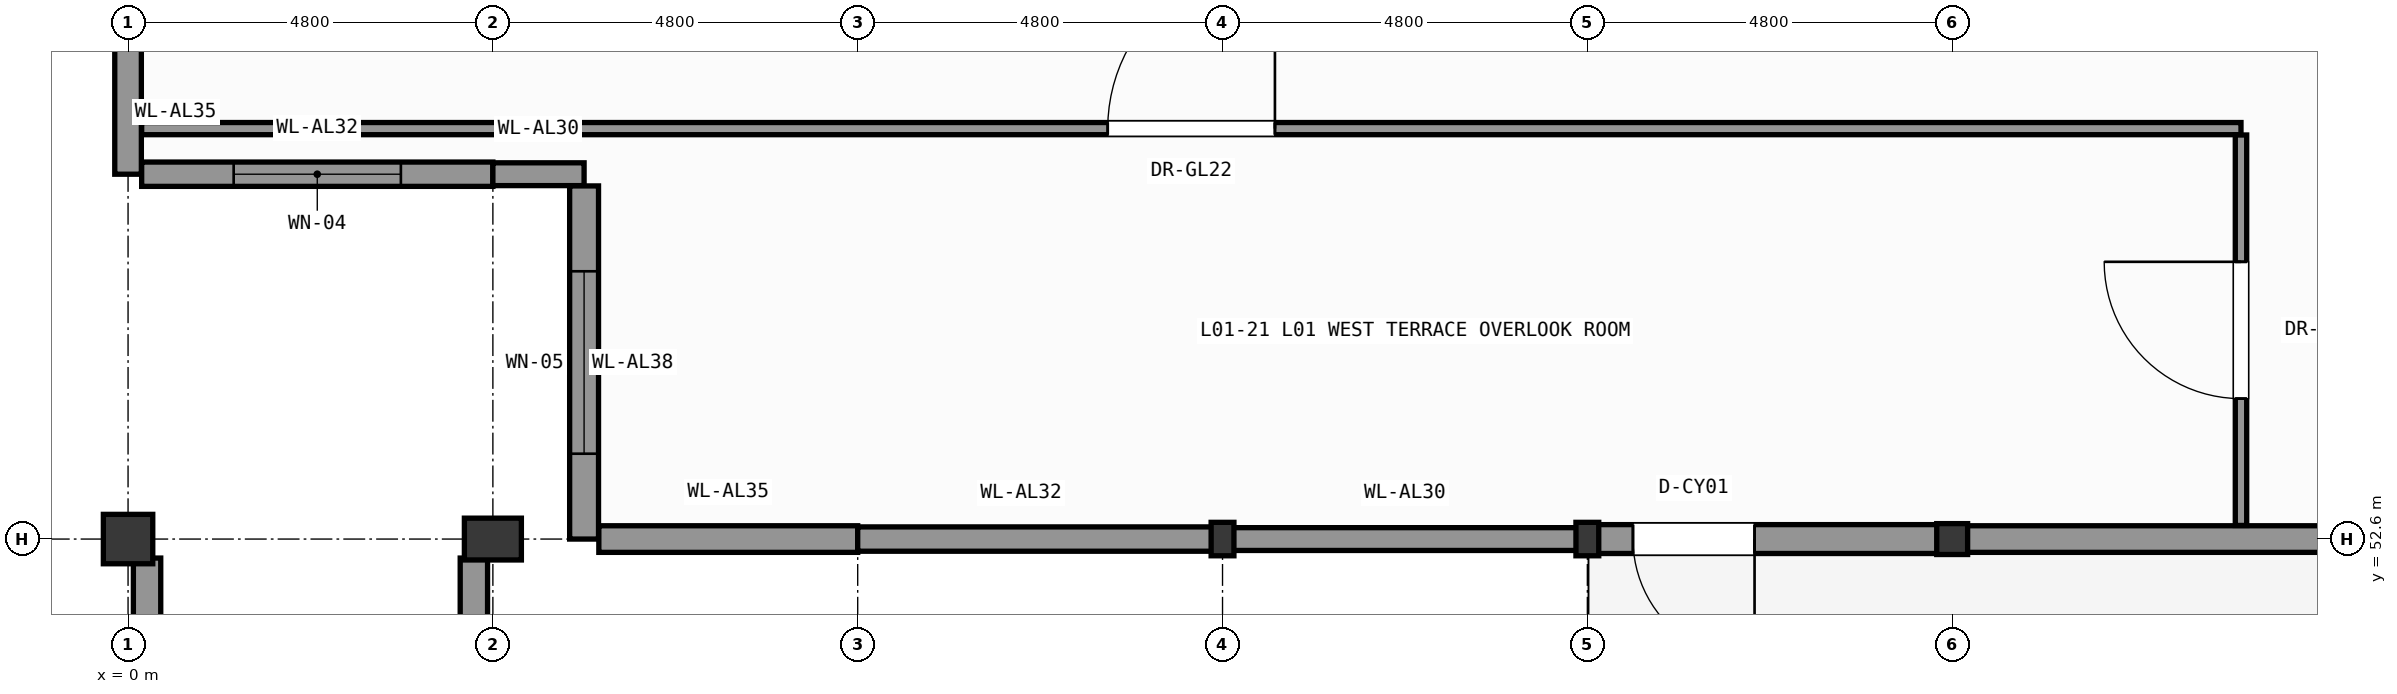
"""IFC4 building model, lengths in metres.
Left out: names, types, materials, properties, quantities, classifications, styles, units other than length and angle.
Written with IfcOpenShell. Run it as: python <this file> out.ifc"""

import sys

from ifc_helpers import new_model, si_unit, direction, frame, frame_2d, origin, origin_2d, place, context, subcontext, project, spatial, rectangle, hollow_circle, i_section, extrude, element, fill, save


model = new_model("IFC4")
c1 = context("Model", 3, precision=1e-05, world=origin(), true_north=direction((0.0, 1.0)))
c2 = subcontext(c1, "Body", "Model", "MODEL_VIEW")
j1 = project(units=[si_unit("LENGTHUNIT", "METRE"), si_unit("PLANEANGLEUNIT", "RADIAN")], contexts=[c1])
p1 = place(None, origin())
s1 = spatial("IfcSite", under=j1, at=p1, CompositionType="ELEMENT")
p2 = place(p1, origin())
s2 = spatial("IfcBuilding", under=s1, at=p2, CompositionType="ELEMENT")
p3 = place(p2, origin())
s3 = spatial("IfcBuildingStorey", under=s2, at=p3, CompositionType="ELEMENT", Elevation=0.0)
p4 = place(p3, frame((0.0, 52.6, 0.0), z_axis=(0.0, 0.0, 1.0), x_axis=(1.0, 0.0, 0.0)))
e1 = element("IfcColumn", 1, at=p4, inside=s3, PredefinedType="PILASTER", context=c2, shape_type="SweptSolid", body=[
    extrude(rectangle(XDim=0.65, YDim=0.65, at=origin_2d()), origin(), (0.0, 0.0, 1.0), 7.8),
])
p5 = place(p3, frame((4.8, 52.6, 0.0), z_axis=(0.0, 0.0, 1.0), x_axis=(1.0, 0.0, 0.0)))
e2 = element("IfcColumn", 2, at=p5, inside=s3, PredefinedType="PILASTER", context=c2, shape_type="SweptSolid", body=[
    extrude(rectangle(XDim=0.75, YDim=0.55, at=origin_2d()), origin(), (0.0, 0.0, 1.0), 7.8),
])
for number, where, z_axis, x_axis in (
    (3, (14.4, 52.6, 0.0), (0.0, 0.0, 1.0), (1.0, 0.0, 0.0)),
    (4, (19.2, 52.6, 0.0), (0.0, 0.0, 1.0), (1.0, 0.0, 0.0)),
):
    element("IfcColumn", number, at=place(p3, frame(where, z_axis=z_axis, x_axis=x_axis)), inside=s3, PredefinedType="COLUMN", context=c2, shape_type="SweptSolid", body=[
        extrude(i_section(OverallWidth=0.3, OverallDepth=0.44, WebThickness=0.011, FlangeThickness=0.021, FilletRadius=0.027, at=origin_2d()), origin(), (0.0, 0.0, 1.0), 7.8),
    ])
p6 = place(p3, frame((24.0, 52.6, 0.0), z_axis=(0.0, 0.0, 1.0), x_axis=(1.0, 0.0, 0.0)))
e5 = element("IfcColumn", 5, at=p6, inside=s3, PredefinedType="COLUMN", context=c2, shape_type="SweptSolid", body=[
    extrude(hollow_circle(Radius=0.203, WallThickness=0.02, at=origin_2d()), origin(), (0.0, 0.0, 1.0), 7.8),
])
p7 = place(p3, frame((0.0, 57.4, 0.0), z_axis=(0.0, 0.0, 1.0), x_axis=(0.0, 1.0, 0.0)))
e6 = element("IfcWall", 6, at=p7, inside=s3, PredefinedType="SOLIDWALL", context=c2, shape_type="SweptSolid", body=[
    extrude(rectangle(XDim=2.2, YDim=0.35, at=frame_2d((1.1, 0.0))), origin(), (0.0, 0.0, 1.0), 7.275),
])
p8 = place(p3, frame((4.8, 57.4, 0.0), z_axis=(0.0, 0.0, 1.0), x_axis=(-1.0, 0.0, 0.0)))
e7 = element("IfcWall", 7, at=p8, inside=s3, PredefinedType="SOLIDWALL", context=c2, shape_type="SweptSolid", body=[
    extrude(rectangle(XDim=4.621, YDim=0.32, at=frame_2d((2.311, 0.0))), origin(), (0.0, 0.0, 1.0), 7.54),
])
p9 = place(p8, frame((1.21, 0.0, 0.95)))
e8 = element("IfcOpeningElement", 8, at=p9, cuts=e7, PredefinedType="OPENING", context=c2, shape_type="SweptSolid", body=[
    extrude(rectangle(XDim=2.2, YDim=4.2, at=frame_2d((1.1, 2.1))), frame((0.0, 0.17, 0.0), z_axis=(0.0, -1.0, 0.0), x_axis=(1.0, 0.0, 0.0)), (0.0, 0.0, 1.0), 0.34),
])
p10 = place(p3, frame((6.0, 57.4, 0.0), z_axis=(0.0, 0.0, 1.0), x_axis=(-1.0, 0.0, 0.0)))
e9 = element("IfcWall", 9, at=p10, inside=s3, PredefinedType="SOLIDWALL", context=c2, shape_type="SweptSolid", body=[
    extrude(rectangle(XDim=1.2, YDim=0.3, at=frame_2d((0.6, 0.0))), origin(), (0.0, 0.0, 1.0), 7.54),
])
p11 = place(p3, frame((6.0, 52.6, 0.0), z_axis=(0.0, 0.0, 1.0), x_axis=(0.0, 1.0, 0.0)))
e10 = element("IfcWall", 10, at=p11, inside=s3, PredefinedType="SOLIDWALL", context=c2, shape_type="SweptSolid", body=[
    extrude(rectangle(XDim=4.646, YDim=0.38, at=frame_2d((2.323, 0.0))), origin(), (0.0, 0.0, 1.0), 7.54),
])
p12 = place(p11, frame((1.123, 0.0, 0.95)))
e11 = element("IfcOpeningElement", 11, at=p12, cuts=e10, PredefinedType="OPENING", context=c2, shape_type="SweptSolid", body=[
    extrude(rectangle(XDim=2.4, YDim=4.6, at=frame_2d((1.2, 2.3))), frame((0.0, 0.2, 0.0), z_axis=(0.0, -1.0, 0.0), x_axis=(1.0, 0.0, 0.0)), (0.0, 0.0, 1.0), 0.4),
])
p13 = place(p3, frame((9.6, 52.6, 0.0), z_axis=(0.0, 0.0, 1.0), x_axis=(-1.0, 0.0, 0.0)))
e12 = element("IfcWall", 12, at=p13, inside=s3, PredefinedType="SOLIDWALL", context=c2, shape_type="SweptSolid", body=[
    extrude(rectangle(XDim=3.406, YDim=0.35, at=frame_2d((1.703, 0.0))), origin(), (0.0, 0.0, 1.0), 7.54),
])
p14 = place(p3, frame((14.4, 52.6, 0.0), z_axis=(0.0, 0.0, 1.0), x_axis=(-1.0, 0.0, 0.0)))
e13 = element("IfcWall", 13, at=p14, inside=s3, PredefinedType="SOLIDWALL", context=c2, shape_type="SweptSolid", body=[
    extrude(rectangle(XDim=4.8, YDim=0.32, at=frame_2d((2.4, 0.0))), origin(), (0.0, 0.0, 1.0), 7.54),
])
p15 = place(p3, frame((19.2, 52.6, 0.0), z_axis=(0.0, 0.0, 1.0), x_axis=(-1.0, 0.0, 0.0)))
e14 = element("IfcWall", 14, at=p15, inside=s3, PredefinedType="SOLIDWALL", context=c2, shape_type="SweptSolid", body=[
    extrude(rectangle(XDim=4.8, YDim=0.3, at=frame_2d((2.4, 0.0))), origin(), (0.0, 0.0, 1.0), 7.225),
])
p16 = place(p3, frame((24.0, 52.6, 0.0), z_axis=(0.0, 0.0, 1.0), x_axis=(-1.0, 0.0, 0.0)))
e15 = element("IfcWall", 15, at=p16, inside=s3, PredefinedType="SOLIDWALL", context=c2, shape_type="SweptSolid", body=[
    extrude(rectangle(XDim=4.8, YDim=0.38, at=frame_2d((2.4, 0.0))), origin(), (0.0, 0.0, 1.0), 7.125),
])
p17 = place(p16, frame((2.6, 0.0, 0.0)))
e16 = element("IfcOpeningElement", 16, at=p17, cuts=e15, PredefinedType="OPENING", context=c2, shape_type="SweptSolid", body=[
    extrude(rectangle(XDim=1.6, YDim=2.4, at=frame_2d((0.8, 1.2))), frame((0.0, 0.2, 0.0), z_axis=(0.0, -1.0, 0.0), x_axis=(1.0, 0.0, 0.0)), (0.0, 0.0, 1.0), 0.4),
])
p18 = place(p3, frame((32.0, 52.6, 0.0), z_axis=(0.0, 0.0, 1.0), x_axis=(-1.0, 0.0, 0.0)))
e17 = element("IfcWall", 17, at=p18, inside=s3, PredefinedType="SOLIDWALL", context=c2, shape_type="SweptSolid", body=[
    extrude(rectangle(XDim=8.0, YDim=0.35, at=frame_2d((4.0, 0.0))), origin(), (0.0, 0.0, 1.0), 7.225),
])
p19 = place(p18, frame((0.9, 0.0, 0.0)))
e18 = element("IfcOpeningElement", 18, at=p19, cuts=e17, PredefinedType="OPENING", context=c2, shape_type="SweptSolid", body=[
    extrude(rectangle(XDim=2.2, YDim=2.7, at=frame_2d((1.1, 1.35))), frame((0.0, 0.185, 0.0), z_axis=(0.0, -1.0, 0.0), x_axis=(1.0, 0.0, 0.0)), (0.0, 0.0, 1.0), 0.37),
])
for number, where, z_axis, x_axis in (
    (19, (0.25, 17.76, 0.0), (0.0, 0.0, 1.0), (0.0, 1.0, 0.0)),
    (20, (4.55, 17.76, 0.0), (0.0, 0.0, 1.0), (0.0, 1.0, 0.0)),
):
    element("IfcWall", number, at=place(p3, frame(where, z_axis=z_axis, x_axis=x_axis)), inside=s3, PredefinedType="SOLIDWALL", context=c2, shape_type="SweptSolid", body=[
        extrude(rectangle(XDim=34.59, YDim=0.36, at=frame_2d((17.295, 0.0))), origin(), (0.0, 0.0, 1.0), 7.58),
    ])
p20 = place(p2, frame((0.0, 0.0, 7.8)))
s4 = spatial("IfcBuildingStorey", under=s2, at=p20, CompositionType="ELEMENT", Elevation=7.8)
for number, where, z_axis, x_axis in (
    (21, (5.0, 29.91, -7.8), (0.0, 0.0, 1.0), (0.0, 1.0, 0.0)),
    (22, (9.35, 29.91, -7.8), (0.0, 0.0, 1.0), (0.0, 1.0, 0.0)),
):
    element("IfcWall", number, at=place(p20, frame(where, z_axis=z_axis, x_axis=x_axis)), inside=s4, PredefinedType="SOLIDWALL", context=c2, shape_type="SweptSolid", body=[
        extrude(rectangle(XDim=22.44, YDim=0.36, at=frame_2d((11.22, 0.0))), origin(), (0.0, 0.0, 1.0), 12.98),
    ])
p21 = place(p2, frame((0.0, 0.0, 13.2)))
s5 = spatial("IfcBuildingStorey", under=s2, at=p21, CompositionType="ELEMENT", Elevation=13.2)
for number, where, z_axis, x_axis in (
    (23, (9.8, 41.46, -13.2), (0.0, 0.0, 1.0), (0.0, 1.0, 0.0)),
    (24, (14.15, 41.46, -13.2), (0.0, 0.0, 1.0), (0.0, 1.0, 0.0)),
):
    element("IfcWall", number, at=place(p21, frame(where, z_axis=z_axis, x_axis=x_axis)), inside=s5, PredefinedType="SOLIDWALL", context=c2, shape_type="SweptSolid", body=[
        extrude(rectangle(XDim=10.89, YDim=0.36, at=frame_2d((5.445, 0.0))), origin(), (0.0, 0.0, 1.0), 17.78),
    ])
p22 = place(p3, frame((0.179, 58.0, 0.0), z_axis=(0.0, 0.0, 1.0), x_axis=(1.0, 0.0, 0.0)))
e25 = element("IfcWall", 25, at=p22, inside=s3, PredefinedType="PARTITIONING", context=c2, shape_type="SweptSolid", body=[
    extrude(rectangle(XDim=27.621, YDim=0.16, at=frame_2d((13.811, 0.0))), origin(), (0.0, 0.0, 1.0), 7.54),
])
p23 = place(p22, frame((12.71, 0.0, 0.0)))
e26 = element("IfcOpeningElement", 26, at=p23, cuts=e25, PredefinedType="OPENING", context=c2, shape_type="SweptSolid", body=[
    extrude(rectangle(XDim=2.2, YDim=2.6, at=frame_2d((1.1, 1.3))), frame((0.0, 0.09, 0.0), z_axis=(0.0, -1.0, 0.0), x_axis=(1.0, 0.0, 0.0)), (0.0, 0.0, 1.0), 0.18),
])
p24 = place(p3, frame((27.8, 52.779, 0.0), z_axis=(0.0, 0.0, 1.0), x_axis=(0.0, 1.0, 0.0)))
e27 = element("IfcWall", 27, at=p24, inside=s3, PredefinedType="PARTITIONING", context=c2, shape_type="SweptSolid", body=[
    extrude(rectangle(XDim=5.137, YDim=0.15, at=frame_2d((2.568, 0.0))), origin(), (0.0, 0.0, 1.0), 7.54),
])
p25 = place(p24, frame((1.668, 0.0, 0.0)))
e28 = element("IfcOpeningElement", 28, at=p25, cuts=e27, PredefinedType="OPENING", context=c2, shape_type="SweptSolid", body=[
    extrude(rectangle(XDim=1.8, YDim=2.4, at=frame_2d((0.9, 1.2))), frame((0.0, 0.085, 0.0), z_axis=(0.0, -1.0, 0.0), x_axis=(1.0, 0.0, 0.0)), (0.0, 0.0, 1.0), 0.17),
])
p26 = place(p9, origin())
e29 = element("IfcWindow", 29, at=p26, inside=s3, PartitioningType="SINGLE_PANEL", PredefinedType="WINDOW", context=c2, shape_type="SweptSolid", body=[
    extrude(rectangle(XDim=2.2, YDim=4.2, at=frame_2d((1.1, 2.1))), frame((0.0, 0.03, 0.0), z_axis=(0.0, -1.0, 0.0), x_axis=(1.0, 0.0, 0.0)), (0.0, 0.0, 1.0), 0.06),
])
fill(e8, e29)
p27 = place(p12, origin())
e30 = element("IfcWindow", 30, at=p27, inside=s3, PartitioningType="SINGLE_PANEL", PredefinedType="WINDOW", context=c2, shape_type="SweptSolid", body=[
    extrude(rectangle(XDim=2.4, YDim=4.6, at=frame_2d((1.2, 2.3))), frame((0.0, 0.03, 0.0), z_axis=(0.0, -1.0, 0.0), x_axis=(1.0, 0.0, 0.0)), (0.0, 0.0, 1.0), 0.06),
])
fill(e11, e30)
p28 = place(p17, origin())
e31 = element("IfcDoor", 31, at=p28, inside=s3, OperationType="SINGLE_SWING_LEFT", PredefinedType="DOOR", context=c2, shape_type="SweptSolid", body=[
    extrude(rectangle(XDim=1.6, YDim=2.4, at=frame_2d((0.8, 1.2))), frame((0.0, 0.025, 0.0), z_axis=(0.0, -1.0, 0.0), x_axis=(1.0, 0.0, 0.0)), (0.0, 0.0, 1.0), 0.05),
])
fill(e16, e31)
p29 = place(p23, origin())
e32 = element("IfcDoor", 32, at=p29, inside=s3, OperationType="SINGLE_SWING_RIGHT", PredefinedType="DOOR", context=c2, shape_type="SweptSolid", body=[
    extrude(rectangle(XDim=2.2, YDim=2.6, at=frame_2d((1.1, 1.3))), frame((0.0, 0.025, 0.0), z_axis=(0.0, -1.0, 0.0), x_axis=(1.0, 0.0, 0.0)), (0.0, 0.0, 1.0), 0.05),
])
fill(e26, e32)
p30 = place(p25, origin())
e33 = element("IfcDoor", 33, at=p30, inside=s3, OperationType="SINGLE_SWING_RIGHT", PredefinedType="DOOR", context=c2, shape_type="SweptSolid", body=[
    extrude(rectangle(XDim=1.8, YDim=2.4, at=frame_2d((0.9, 1.2))), frame((0.0, 0.025, 0.0), z_axis=(0.0, -1.0, 0.0), x_axis=(1.0, 0.0, 0.0)), (0.0, 0.0, 1.0), 0.05),
])
fill(e28, e33)
save(model, sys.argv[1])
